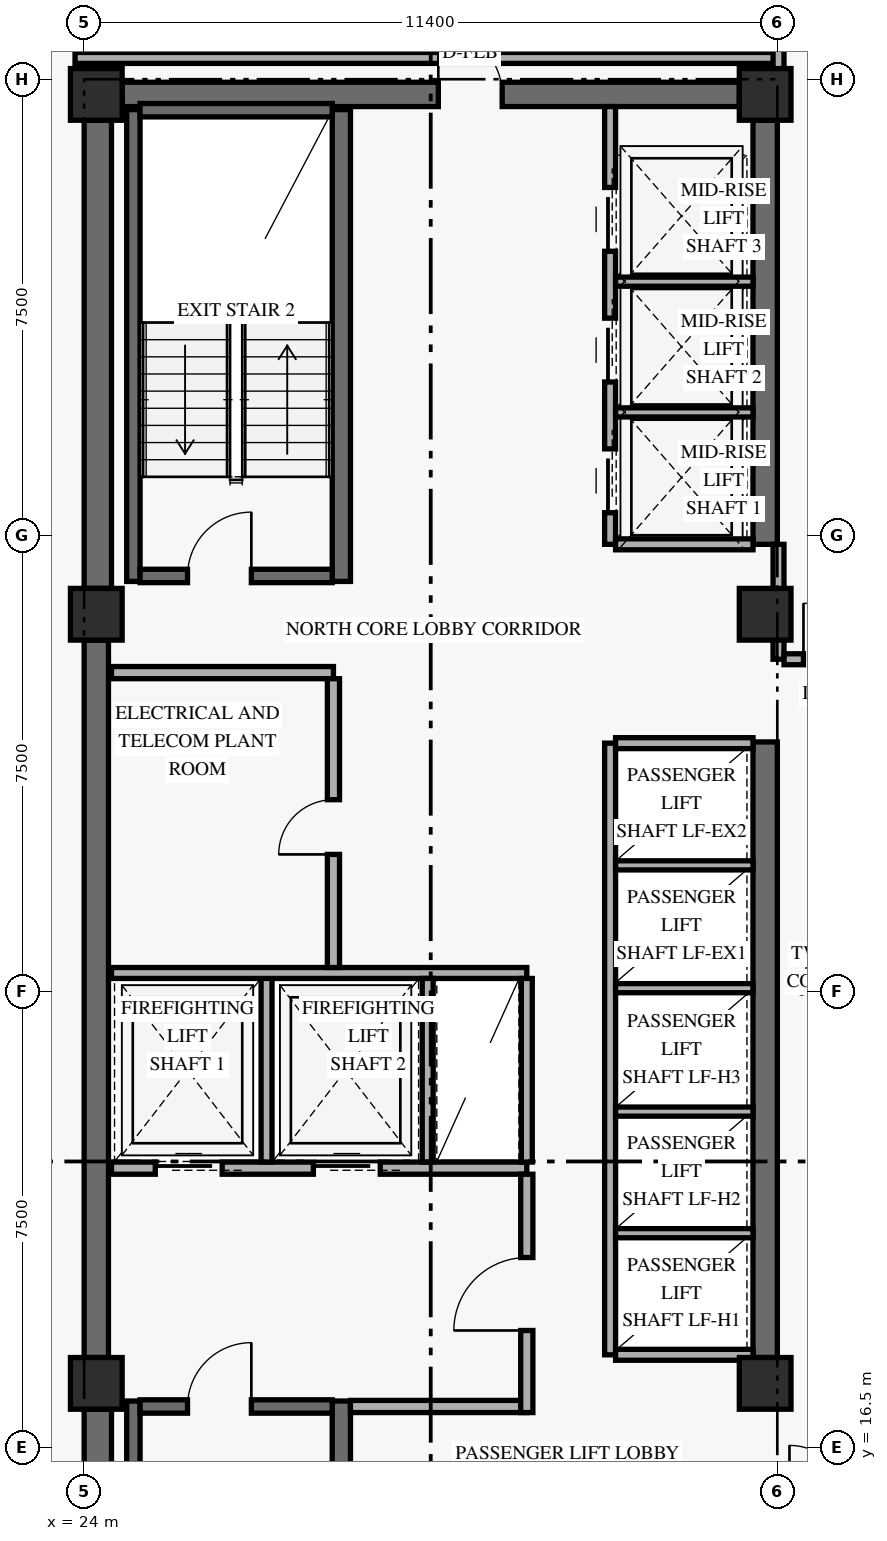
"""IFC4 building model, lengths in metres.
Left out: names, types, materials, properties, quantities, classifications, styles, units other than length and angle.
Written with IfcOpenShell. Run it as: python <this file> out.ifc"""

import sys

from ifc_helpers import new_model, si_unit, direction, frame, frame_2d, origin, origin_2d, place, context, subcontext, project, spatial, rectangle, extrude, element, fill, save


model = new_model("IFC4")
c1 = context("Model", 3, precision=1e-05, world=origin(), true_north=direction((0.0, 1.0)))
c2 = subcontext(c1, "Body", "Model", "MODEL_VIEW")
j1 = project(units=[si_unit("LENGTHUNIT", "METRE"), si_unit("PLANEANGLEUNIT", "RADIAN")], contexts=[c1])
p1 = place(None, origin())
s1 = spatial("IfcSite", under=j1, at=p1, CompositionType="ELEMENT")
p2 = place(p1, origin())
s2 = spatial("IfcBuilding", under=s1, at=p2, CompositionType="ELEMENT")
p3 = place(p2, frame((0.0, 0.0, 106.2)))
s3 = spatial("IfcBuildingStorey", under=s2, at=p3, CompositionType="ELEMENT", Elevation=106.2)
p4 = place(p3, frame((24.225, 9.675, 0.0), z_axis=(0.0, 0.0, 1.0), x_axis=(0.0, 1.0, 0.0)))
e1 = element("IfcWall", 1, at=p4, inside=s3, PredefinedType="SHEAR", context=c2, shape_type="SweptSolid", body=[
    extrude(rectangle(XDim=7.45, YDim=0.45, at=frame_2d((3.725, 0.0))), origin(), (0.0, 0.0, 1.0), 2.749),
])
p5 = place(p3, frame((24.2, 17.975, 0.0), z_axis=(0.0, 0.0, 1.0), x_axis=(0.0, 1.0, 0.0)))
e2 = element("IfcWall", 2, at=p5, inside=s3, PredefinedType="SHEAR", context=c2, shape_type="SweptSolid", body=[
    extrude(rectangle(XDim=11.8, YDim=0.4, at=frame_2d((5.9, 0.0))), origin(), (0.0, 0.0, 1.0), 2.749),
])
p6 = place(p3, frame((24.225, 30.625, 0.0), z_axis=(0.0, 0.0, 1.0), x_axis=(0.0, 1.0, 0.0)))
e3 = element("IfcWall", 3, at=p6, inside=s3, PredefinedType="SHEAR", context=c2, shape_type="SweptSolid", body=[
    extrude(rectangle(XDim=7.7, YDim=0.45, at=frame_2d((3.85, 0.0))), origin(), (0.0, 0.0, 1.0), 2.749),
])
p7 = place(p3, frame((35.2, 17.975, 0.0), z_axis=(0.0, 0.0, 1.0), x_axis=(0.0, 1.0, 0.0)))
e4 = element("IfcWall", 4, at=p7, inside=s3, PredefinedType="SHEAR", context=c2, shape_type="SweptSolid", body=[
    extrude(rectangle(XDim=10.125, YDim=0.4, at=frame_2d((5.062, 0.0))), origin(), (0.0, 0.0, 1.0), 2.749),
])
p8 = place(p3, frame((35.2, 31.35, 0.0), z_axis=(0.0, 0.0, 1.0), x_axis=(0.0, 1.0, 0.0)))
e5 = element("IfcWall", 5, at=p8, inside=s3, PredefinedType="SHEAR", context=c2, shape_type="SweptSolid", body=[
    extrude(rectangle(XDim=6.975, YDim=0.4, at=frame_2d((3.487, 0.0))), origin(), (0.0, 0.0, 1.0), 2.749),
])
p9 = place(p3, frame((24.625, 38.75, 0.0), z_axis=(0.0, 0.0, 1.0), x_axis=(1.0, 0.0, 0.0)))
e6 = element("IfcWall", 6, at=p9, inside=s3, PredefinedType="SHEAR", context=c2, shape_type="SweptSolid", body=[
    extrude(rectangle(XDim=10.15, YDim=0.4, at=frame_2d((5.075, 0.0))), origin(), (0.0, 0.0, 1.0), 3.36),
])
p10 = place(p9, frame((5.2, 0.0, 0.0)))
e7 = element("IfcOpeningElement", 7, at=p10, cuts=e6, PredefinedType="OPENING", context=c2, shape_type="SweptSolid", body=[
    extrude(rectangle(XDim=1.05, YDim=2.15, at=frame_2d((0.525, 1.075))), frame((0.0, 0.21, 0.0), z_axis=(0.0, -1.0, 0.0), x_axis=(1.0, 0.0, 0.0)), (0.0, 0.0, 1.0), 0.42),
])
p11 = place(p3, frame((24.81, 9.5, 0.0), z_axis=(0.0, 0.0, 1.0), x_axis=(0.0, 1.0, 0.0)))
e8 = element("IfcWall", 8, at=p11, inside=s3, PredefinedType="SHEAR", context=c2, shape_type="SweptSolid", body=[
    extrude(rectangle(XDim=7.76, YDim=0.22, at=frame_2d((3.88, 0.0))), origin(), (0.0, 0.0, 1.0), 3.36),
])
p12 = place(p3, frame((28.23, 9.5, 0.0), z_axis=(0.0, 0.0, 1.0), x_axis=(0.0, 1.0, 0.0)))
e9 = element("IfcWall", 9, at=p12, inside=s3, PredefinedType="SHEAR", context=c2, shape_type="SweptSolid", body=[
    extrude(rectangle(XDim=7.76, YDim=0.3, at=frame_2d((3.88, 0.0))), origin(), (0.0, 0.0, 1.0), 3.36),
])
p13 = place(p3, frame((24.92, 17.17, 0.0), z_axis=(0.0, 0.0, 1.0), x_axis=(1.0, 0.0, 0.0)))
e10 = element("IfcWall", 10, at=p13, inside=s3, PredefinedType="SHEAR", context=c2, shape_type="SweptSolid", body=[
    extrude(rectangle(XDim=3.16, YDim=0.22, at=frame_2d((1.58, 0.0))), origin(), (0.0, 0.0, 1.0), 3.36),
])
p14 = place(p13, frame((0.78, 0.0, 0.0)))
e11 = element("IfcOpeningElement", 11, at=p14, cuts=e10, PredefinedType="OPENING", context=c2, shape_type="SweptSolid", body=[
    extrude(rectangle(XDim=1.05, YDim=2.15, at=frame_2d((0.525, 1.075))), frame((0.0, 0.12, 0.0), z_axis=(0.0, -1.0, 0.0), x_axis=(1.0, 0.0, 0.0)), (0.0, 0.0, 1.0), 0.24),
])
p15 = place(p3, frame((24.81, 30.74, 0.0), z_axis=(0.0, 0.0, 1.0), x_axis=(0.0, 1.0, 0.0)))
e12 = element("IfcWall", 12, at=p15, inside=s3, PredefinedType="SHEAR", context=c2, shape_type="SweptSolid", body=[
    extrude(rectangle(XDim=7.76, YDim=0.22, at=frame_2d((3.88, 0.0))), origin(), (0.0, 0.0, 1.0), 3.36),
])
p16 = place(p3, frame((28.23, 30.74, 0.0), z_axis=(0.0, 0.0, 1.0), x_axis=(0.0, 1.0, 0.0)))
e13 = element("IfcWall", 13, at=p16, inside=s3, PredefinedType="SHEAR", context=c2, shape_type="SweptSolid", body=[
    extrude(rectangle(XDim=7.76, YDim=0.3, at=frame_2d((3.88, 0.0))), origin(), (0.0, 0.0, 1.0), 3.36),
])
p17 = place(p3, frame((24.92, 30.83, 0.0), z_axis=(0.0, 0.0, 1.0), x_axis=(1.0, 0.0, 0.0)))
e14 = element("IfcWall", 14, at=p17, inside=s3, PredefinedType="SHEAR", context=c2, shape_type="SweptSolid", body=[
    extrude(rectangle(XDim=3.16, YDim=0.22, at=frame_2d((1.58, 0.0))), origin(), (0.0, 0.0, 1.0), 3.36),
])
p18 = place(p17, frame((0.78, 0.0, 0.0)))
e15 = element("IfcOpeningElement", 15, at=p18, cuts=e14, PredefinedType="OPENING", context=c2, shape_type="SweptSolid", body=[
    extrude(rectangle(XDim=1.05, YDim=2.15, at=frame_2d((0.525, 1.075))), frame((0.0, 0.12, 0.0), z_axis=(0.0, -1.0, 0.0), x_axis=(1.0, 0.0, 0.0)), (0.0, 0.0, 1.0), 0.24),
])
p19 = place(p3, frame((24.92, 38.49, 0.0), z_axis=(0.0, 0.0, 1.0), x_axis=(1.0, 0.0, 0.0)))
e16 = element("IfcWall", 16, at=p19, inside=s3, PredefinedType="SHEAR", context=c2, shape_type="SweptSolid", body=[
    extrude(rectangle(XDim=3.16, YDim=0.22, at=frame_2d((1.58, 0.0))), origin(), (0.0, 0.0, 1.0), 3.36),
])
for number, where, z_axis, x_axis in (
    (17, (24.2, 17.55, 0.0), (0.0, 0.0, 1.0), (1.0, 0.0, 0.0)),
    (18, (24.2, 30.2, 0.0), (0.0, 0.0, 1.0), (1.0, 0.0, 0.0)),
    (19, (24.2, 38.75, 0.0), (0.0, 0.0, 1.0), (1.0, 0.0, 0.0)),
    (20, (35.2, 17.55, 0.0), (0.0, 0.0, 1.0), (1.0, 0.0, 0.0)),
    (21, (35.2, 30.2, 0.0), (0.0, 0.0, 1.0), (1.0, 0.0, 0.0)),
    (22, (35.2, 38.75, 0.0), (0.0, 0.0, 1.0), (1.0, 0.0, 0.0)),
):
    element("IfcColumn", number, at=place(p3, frame(where, z_axis=z_axis, x_axis=x_axis)), inside=s3, PredefinedType="COLUMN", context=c2, shape_type="SweptSolid", body=[
        extrude(rectangle(XDim=0.85, YDim=0.85, at=origin_2d()), origin(), (0.0, 0.0, 1.0), 3.6),
    ])
p20 = place(p3, frame((24.45, 21.09, 0.0), z_axis=(0.0, 0.0, 1.0), x_axis=(1.0, 0.0, 0.0)))
e23 = element("IfcWall", 23, at=p20, inside=s3, PredefinedType="STANDARD", context=c2, shape_type="SweptSolid", body=[
    extrude(rectangle(XDim=6.83, YDim=0.2, at=frame_2d((3.415, 0.0))), origin(), (0.0, 0.0, 1.0), 3.36),
])
p21 = place(p20, frame((0.72, 0.0, 0.0)))
e24 = element("IfcOpeningElement", 24, at=p21, cuts=e23, PredefinedType="OPENING", context=c2, shape_type="SweptSolid", body=[
    extrude(rectangle(XDim=1.1, YDim=2.2, at=frame_2d((0.55, 1.1))), frame((0.0, 0.11, 0.0), z_axis=(0.0, -1.0, 0.0), x_axis=(1.0, 0.0, 0.0)), (0.0, 0.0, 1.0), 0.22),
])
p22 = place(p20, frame((3.32, 0.0, 0.0)))
e25 = element("IfcOpeningElement", 25, at=p22, cuts=e23, PredefinedType="OPENING", context=c2, shape_type="SweptSolid", body=[
    extrude(rectangle(XDim=1.1, YDim=2.2, at=frame_2d((0.55, 1.1))), frame((0.0, 0.11, 0.0), z_axis=(0.0, -1.0, 0.0), x_axis=(1.0, 0.0, 0.0)), (0.0, 0.0, 1.0), 0.22),
])
p23 = place(p3, frame((28.38, 17.17, 0.0), z_axis=(0.0, 0.0, 1.0), x_axis=(1.0, 0.0, 0.0)))
e26 = element("IfcWall", 26, at=p23, inside=s3, PredefinedType="STANDARD", context=c2, shape_type="SweptSolid", body=[
    extrude(rectangle(XDim=2.9, YDim=0.2, at=frame_2d((1.45, 0.0))), origin(), (0.0, 0.0, 1.0), 3.36),
])
p24 = place(p3, frame((31.28, 17.07, 0.0), z_axis=(0.0, 0.0, 1.0), x_axis=(0.0, 1.0, 0.0)))
e27 = element("IfcWall", 27, at=p24, inside=s3, PredefinedType="STANDARD", context=c2, shape_type="SweptSolid", body=[
    extrude(rectangle(XDim=3.92, YDim=0.2, at=frame_2d((1.96, 0.0))), origin(), (0.0, 0.0, 1.0), 2.731),
])
p25 = place(p24, frame((1.35, 0.0, 0.0)))
e28 = element("IfcOpeningElement", 28, at=p25, cuts=e27, PredefinedType="OPENING", context=c2, shape_type="SweptSolid", body=[
    extrude(rectangle(XDim=1.2, YDim=2.15, at=frame_2d((0.6, 1.075))), frame((0.0, 0.11, 0.0), z_axis=(0.0, -1.0, 0.0), x_axis=(1.0, 0.0, 0.0)), (0.0, 0.0, 1.0), 0.22),
])
p26 = place(p3, frame((27.0, 21.19, 0.0), z_axis=(0.0, 0.0, 1.0), x_axis=(0.0, 1.0, 0.0)))
e29 = element("IfcWall", 29, at=p26, inside=s3, PredefinedType="STANDARD", context=c2, shape_type="SweptSolid", body=[
    extrude(rectangle(XDim=3.11, YDim=0.18, at=frame_2d((1.555, 0.0))), origin(), (0.0, 0.0, 1.0), 3.36),
])
p27 = place(p3, frame((24.45, 24.3, 0.0), z_axis=(0.0, 0.0, 1.0), x_axis=(1.0, 0.0, 0.0)))
e30 = element("IfcWall", 30, at=p27, inside=s3, PredefinedType="STANDARD", context=c2, shape_type="SweptSolid", body=[
    extrude(rectangle(XDim=6.83, YDim=0.18, at=frame_2d((3.415, 0.0))), origin(), (0.0, 0.0, 1.0), 3.36),
])
for number, where, z_axis, x_axis in (
    (31, (29.65, 21.19, 0.0), (0.0, 0.0, 1.0), (0.0, 1.0, 0.0)),
    (32, (31.28, 21.19, 0.0), (0.0, 0.0, 1.0), (0.0, 1.0, 0.0)),
):
    element("IfcWall", number, at=place(p3, frame(where, z_axis=z_axis, x_axis=x_axis)), inside=s3, PredefinedType="STANDARD", context=c2, shape_type="SweptSolid", body=[
        extrude(rectangle(XDim=3.02, YDim=0.18, at=frame_2d((1.51, 0.0))), origin(), (0.0, 0.0, 1.0), 3.36),
    ])
p28 = place(p3, frame((24.45, 29.24, 0.0), z_axis=(0.0, 0.0, 1.0), x_axis=(1.0, 0.0, 0.0)))
e33 = element("IfcWall", 33, at=p28, inside=s3, PredefinedType="STANDARD", context=c2, shape_type="SweptSolid", body=[
    extrude(rectangle(XDim=3.65, YDim=0.2, at=frame_2d((1.825, 0.0))), origin(), (0.0, 0.0, 1.0), 3.36),
])
p29 = place(p3, frame((28.1, 24.39, 0.0), z_axis=(0.0, 0.0, 1.0), x_axis=(0.0, 1.0, 0.0)))
e34 = element("IfcWall", 34, at=p29, inside=s3, PredefinedType="STANDARD", context=c2, shape_type="SweptSolid", body=[
    extrude(rectangle(XDim=4.75, YDim=0.2, at=frame_2d((2.375, 0.0))), origin(), (0.0, 0.0, 1.0), 3.36),
])
p30 = place(p29, frame((1.86, 0.0, 0.0)))
e35 = element("IfcOpeningElement", 35, at=p30, cuts=e34, PredefinedType="OPENING", context=c2, shape_type="SweptSolid", body=[
    extrude(rectangle(XDim=0.9, YDim=2.1, at=frame_2d((0.45, 1.05))), frame((0.0, 0.11, 0.0), z_axis=(0.0, -1.0, 0.0), x_axis=(1.0, 0.0, 0.0)), (0.0, 0.0, 1.0), 0.22),
])
p31 = place(p3, frame((32.65, 18.02, 0.0), z_axis=(0.0, 0.0, 1.0), x_axis=(0.0, 1.0, 0.0)))
e36 = element("IfcWall", 36, at=p31, inside=s3, PredefinedType="STANDARD", context=c2, shape_type="SweptSolid", body=[
    extrude(rectangle(XDim=10.06, YDim=0.18, at=frame_2d((5.03, 0.0))), origin(), (0.0, 0.0, 1.0), 3.36),
])
for number, where, z_axis, x_axis in (
    (37, (32.74, 18.02, 0.0), (0.0, 0.0, 1.0), (1.0, 0.0, 0.0)),
    (38, (32.74, 28.08, 0.0), (0.0, 0.0, 1.0), (1.0, 0.0, 0.0)),
):
    element("IfcWall", number, at=place(p3, frame(where, z_axis=z_axis, x_axis=x_axis)), inside=s3, PredefinedType="STANDARD", context=c2, shape_type="SweptSolid", body=[
        extrude(rectangle(XDim=2.26, YDim=0.18, at=frame_2d((1.13, 0.0))), origin(), (0.0, 0.0, 1.0), 3.36),
    ])
for number, where, z_axis, x_axis in (
    (39, (32.74, 20.02, 0.0), (0.0, 0.0, 1.0), (1.0, 0.0, 0.0)),
    (40, (32.74, 22.02, 0.0), (0.0, 0.0, 1.0), (1.0, 0.0, 0.0)),
    (41, (32.74, 24.05, 0.0), (0.0, 0.0, 1.0), (1.0, 0.0, 0.0)),
    (42, (32.74, 26.07, 0.0), (0.0, 0.0, 1.0), (1.0, 0.0, 0.0)),
):
    element("IfcWall", number, at=place(p3, frame(where, z_axis=z_axis, x_axis=x_axis)), inside=s3, PredefinedType="STANDARD", context=c2, shape_type="SweptSolid", body=[
        extrude(rectangle(XDim=2.26, YDim=0.15, at=frame_2d((1.13, 0.0))), origin(), (0.0, 0.0, 1.0), 3.36),
    ])
p32 = place(p3, frame((32.65, 31.35, 0.0), z_axis=(0.0, 0.0, 1.0), x_axis=(0.0, 1.0, 0.0)))
e43 = element("IfcWall", 43, at=p32, inside=s3, PredefinedType="STANDARD", context=c2, shape_type="SweptSolid", body=[
    extrude(rectangle(XDim=7.2, YDim=0.18, at=frame_2d((3.6, 0.0))), origin(), (0.0, 0.0, 1.0), 3.36),
])
p33 = place(p32, frame((0.52, 0.0, 0.0)))
e44 = element("IfcOpeningElement", 44, at=p33, cuts=e43, PredefinedType="OPENING", context=c2, shape_type="SweptSolid", body=[
    extrude(rectangle(XDim=1.05, YDim=2.2, at=frame_2d((0.525, 1.1))), frame((0.0, 0.1, 0.0), z_axis=(0.0, -1.0, 0.0), x_axis=(1.0, 0.0, 0.0)), (0.0, 0.0, 1.0), 0.2),
])
p34 = place(p32, frame((2.67, 0.0, 0.0)))
e45 = element("IfcOpeningElement", 45, at=p34, cuts=e43, PredefinedType="OPENING", context=c2, shape_type="SweptSolid", body=[
    extrude(rectangle(XDim=1.05, YDim=2.2, at=frame_2d((0.525, 1.1))), frame((0.0, 0.1, 0.0), z_axis=(0.0, -1.0, 0.0), x_axis=(1.0, 0.0, 0.0)), (0.0, 0.0, 1.0), 0.2),
])
p35 = place(p32, frame((4.82, 0.0, 0.0)))
e46 = element("IfcOpeningElement", 46, at=p35, cuts=e43, PredefinedType="OPENING", context=c2, shape_type="SweptSolid", body=[
    extrude(rectangle(XDim=1.05, YDim=2.2, at=frame_2d((0.525, 1.1))), frame((0.0, 0.1, 0.0), z_axis=(0.0, -1.0, 0.0), x_axis=(1.0, 0.0, 0.0)), (0.0, 0.0, 1.0), 0.2),
])
p36 = place(p3, frame((32.74, 31.35, 0.0), z_axis=(0.0, 0.0, 1.0), x_axis=(1.0, 0.0, 0.0)))
e47 = element("IfcWall", 47, at=p36, inside=s3, PredefinedType="STANDARD", context=c2, shape_type="SweptSolid", body=[
    extrude(rectangle(XDim=2.26, YDim=0.18, at=frame_2d((1.13, 0.0))), origin(), (0.0, 0.0, 1.0), 3.36),
])
for number, where, z_axis, x_axis in (
    (48, (32.74, 33.52, 0.0), (0.0, 0.0, 1.0), (1.0, 0.0, 0.0)),
    (49, (32.74, 35.67, 0.0), (0.0, 0.0, 1.0), (1.0, 0.0, 0.0)),
):
    element("IfcWall", number, at=place(p3, frame(where, z_axis=z_axis, x_axis=x_axis)), inside=s3, PredefinedType="STANDARD", context=c2, shape_type="SweptSolid", body=[
        extrude(rectangle(XDim=2.26, YDim=0.15, at=frame_2d((1.13, 0.0))), origin(), (0.0, 0.0, 1.0), 3.36),
    ])
p37 = place(p3, frame((35.42, 29.46, 0.0), z_axis=(0.0, 0.0, 1.0), x_axis=(0.0, 1.0, 0.0)))
e50 = element("IfcWall", 50, at=p37, inside=s3, PredefinedType="STANDARD", context=c2, shape_type="SweptSolid", body=[
    extrude(rectangle(XDim=1.89, YDim=0.18, at=frame_2d((0.945, 0.0))), origin(), (0.0, 0.0, 1.0), 2.731),
])
p38 = place(p3, frame((35.51, 29.46, 0.0), z_axis=(0.0, 0.0, 1.0), x_axis=(1.0, 0.0, 0.0)))
e51 = element("IfcWall", 51, at=p38, inside=s3, PredefinedType="STANDARD", context=c2, shape_type="SweptSolid", body=[
    extrude(rectangle(XDim=10.09, YDim=0.18, at=frame_2d((5.045, 0.0))), origin(), (0.0, 0.0, 1.0), 2.731),
])
p39 = place(p38, frame((0.32, 0.0, 0.0)))
e52 = element("IfcOpeningElement", 52, at=p39, cuts=e51, PredefinedType="OPENING", context=c2, shape_type="SweptSolid", body=[
    extrude(rectangle(XDim=0.92, YDim=2.15, at=frame_2d((0.46, 1.075))), frame((0.0, 0.1, 0.0), z_axis=(0.0, -1.0, 0.0), x_axis=(1.0, 0.0, 0.0)), (0.0, 0.0, 1.0), 0.2),
])
p40 = place(p3, frame((23.85, 39.35, 0.0), z_axis=(0.0, 0.0, 1.0), x_axis=(1.0, 0.0, 0.0)))
e53 = element("IfcWall", 53, at=p40, inside=s3, PredefinedType="STANDARD", context=c2, shape_type="SweptSolid", body=[
    extrude(rectangle(XDim=11.57, YDim=0.18, at=frame_2d((5.785, 0.0))), origin(), (0.0, 0.0, 1.0), 2.731),
])
p41 = place(p3, frame((35.42, 38.75, 0.0), z_axis=(0.0, 0.0, 1.0), x_axis=(0.0, 1.0, 0.0)))
e54 = element("IfcWall", 54, at=p41, inside=s3, PredefinedType="PARTITIONING", context=c2, shape_type="SweptSolid", body=[
    extrude(rectangle(XDim=6.27, YDim=0.18, at=frame_2d((3.135, 0.0))), origin(), (0.0, 0.0, 1.0), 2.731),
])
p42 = place(p14, frame((1.05, 0.0, 0.0), z_axis=(0.0, 0.0, 1.0), x_axis=(-1.0, 0.0, 0.0)))
e55 = element("IfcDoor", 55, at=p42, inside=s3, OperationType="SINGLE_SWING_LEFT", PredefinedType="DOOR", context=c2, shape_type="SweptSolid", body=[
    extrude(rectangle(XDim=1.05, YDim=2.15, at=frame_2d((0.525, 1.075))), frame((0.0, 0.025, 0.0), z_axis=(0.0, -1.0, 0.0), x_axis=(1.0, 0.0, 0.0)), (0.0, 0.0, 1.0), 0.05),
])
fill(e11, e55)
p43 = place(p18, origin())
e56 = element("IfcDoor", 56, at=p43, inside=s3, OperationType="SINGLE_SWING_RIGHT", PredefinedType="DOOR", context=c2, shape_type="SweptSolid", body=[
    extrude(rectangle(XDim=1.05, YDim=2.15, at=frame_2d((0.525, 1.075))), frame((0.0, 0.025, 0.0), z_axis=(0.0, -1.0, 0.0), x_axis=(1.0, 0.0, 0.0)), (0.0, 0.0, 1.0), 0.05),
])
fill(e15, e56)
p44 = place(p21, origin())
e57 = element("IfcDoor", 57, at=p44, inside=s3, OperationType="SLIDING_TO_LEFT", PredefinedType="DOOR", context=c2, shape_type="SweptSolid", body=[
    extrude(rectangle(XDim=1.1, YDim=2.2, at=frame_2d((0.55, 1.1))), frame((0.0, 0.025, 0.0), z_axis=(0.0, -1.0, 0.0), x_axis=(1.0, 0.0, 0.0)), (0.0, 0.0, 1.0), 0.05),
])
fill(e24, e57)
p45 = place(p22, origin())
e58 = element("IfcDoor", 58, at=p45, inside=s3, OperationType="SLIDING_TO_LEFT", PredefinedType="DOOR", context=c2, shape_type="SweptSolid", body=[
    extrude(rectangle(XDim=1.1, YDim=2.2, at=frame_2d((0.55, 1.1))), frame((0.0, 0.025, 0.0), z_axis=(0.0, -1.0, 0.0), x_axis=(1.0, 0.0, 0.0)), (0.0, 0.0, 1.0), 0.05),
])
fill(e25, e58)
p46 = place(p25, origin())
e59 = element("IfcDoor", 59, at=p46, inside=s3, OperationType="SINGLE_SWING_LEFT", PredefinedType="DOOR", context=c2, shape_type="SweptSolid", body=[
    extrude(rectangle(XDim=1.2, YDim=2.15, at=frame_2d((0.6, 1.075))), frame((0.0, 0.025, 0.0), z_axis=(0.0, -1.0, 0.0), x_axis=(1.0, 0.0, 0.0)), (0.0, 0.0, 1.0), 0.05),
])
fill(e28, e59)
p47 = place(p30, origin())
e60 = element("IfcDoor", 60, at=p47, inside=s3, OperationType="SINGLE_SWING_LEFT", PredefinedType="DOOR", context=c2, shape_type="SweptSolid", body=[
    extrude(rectangle(XDim=0.9, YDim=2.1, at=frame_2d((0.45, 1.05))), frame((0.0, 0.025, 0.0), z_axis=(0.0, -1.0, 0.0), x_axis=(1.0, 0.0, 0.0)), (0.0, 0.0, 1.0), 0.05),
])
fill(e35, e60)
p48 = place(p33, origin())
e61 = element("IfcDoor", 61, at=p48, inside=s3, OperationType="SLIDING_TO_LEFT", PredefinedType="DOOR", context=c2, shape_type="SweptSolid", body=[
    extrude(rectangle(XDim=1.05, YDim=2.2, at=frame_2d((0.525, 1.1))), frame((0.0, 0.025, 0.0), z_axis=(0.0, -1.0, 0.0), x_axis=(1.0, 0.0, 0.0)), (0.0, 0.0, 1.0), 0.05),
])
fill(e44, e61)
p49 = place(p34, origin())
e62 = element("IfcDoor", 62, at=p49, inside=s3, OperationType="SLIDING_TO_LEFT", PredefinedType="DOOR", context=c2, shape_type="SweptSolid", body=[
    extrude(rectangle(XDim=1.05, YDim=2.2, at=frame_2d((0.525, 1.1))), frame((0.0, 0.025, 0.0), z_axis=(0.0, -1.0, 0.0), x_axis=(1.0, 0.0, 0.0)), (0.0, 0.0, 1.0), 0.05),
])
fill(e45, e62)
p50 = place(p35, origin())
e63 = element("IfcDoor", 63, at=p50, inside=s3, OperationType="SLIDING_TO_LEFT", PredefinedType="DOOR", context=c2, shape_type="SweptSolid", body=[
    extrude(rectangle(XDim=1.05, YDim=2.2, at=frame_2d((0.525, 1.1))), frame((0.0, 0.025, 0.0), z_axis=(0.0, -1.0, 0.0), x_axis=(1.0, 0.0, 0.0)), (0.0, 0.0, 1.0), 0.05),
])
fill(e46, e63)
p51 = place(p10, frame((1.05, 0.0, 0.0), z_axis=(0.0, 0.0, 1.0), x_axis=(-1.0, 0.0, 0.0)))
e64 = element("IfcDoor", 64, at=p51, inside=s3, OperationType="SINGLE_SWING_RIGHT", PredefinedType="DOOR", context=c2, shape_type="SweptSolid", body=[
    extrude(rectangle(XDim=1.05, YDim=2.15, at=frame_2d((0.525, 1.075))), frame((0.0, 0.025, 0.0), z_axis=(0.0, -1.0, 0.0), x_axis=(1.0, 0.0, 0.0)), (0.0, 0.0, 1.0), 0.05),
])
fill(e7, e64)
p52 = place(p39, origin())
e65 = element("IfcDoor", 65, at=p52, inside=s3, OperationType="SINGLE_SWING_LEFT", PredefinedType="DOOR", context=c2, shape_type="SweptSolid", body=[
    extrude(rectangle(XDim=0.92, YDim=2.15, at=frame_2d((0.46, 1.075))), frame((0.0, 0.025, 0.0), z_axis=(0.0, -1.0, 0.0), x_axis=(1.0, 0.0, 0.0)), (0.0, 0.0, 1.0), 0.05),
])
fill(e52, e65)
save(model, sys.argv[1])
